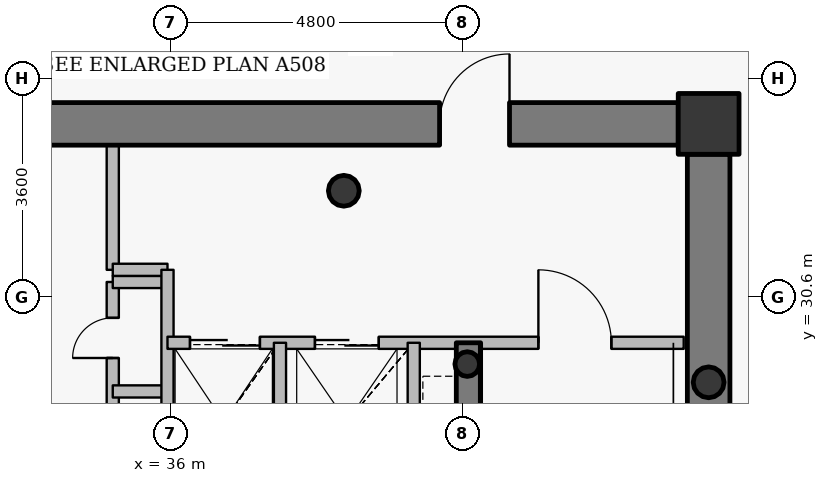
"""IFC4 building model, lengths in metres.
Left out: names, types, materials, properties, quantities, classifications, styles, units other than length and angle.
Written with IfcOpenShell. Run it as: python <this file> out.ifc"""

import sys

from ifc_helpers import new_model, si_unit, direction, frame, frame_2d, origin, origin_2d, place, context, subcontext, project, spatial, rectangle, hollow_circle, extrude, source, transform, mapped, element, fill, save


model = new_model("IFC4")
c1 = context("Model", 3, precision=1e-05, world=origin(), true_north=direction((0.0, 1.0)))
c2 = subcontext(c1, "Body", "Model", "MODEL_VIEW")
j1 = project(units=[si_unit("LENGTHUNIT", "METRE"), si_unit("PLANEANGLEUNIT", "RADIAN")], contexts=[c1])
p1 = place(None, origin())
s1 = spatial("IfcSite", under=j1, at=p1, CompositionType="ELEMENT")
p2 = place(p1, origin())
s2 = spatial("IfcBuilding", under=s1, at=p2, CompositionType="ELEMENT")
p3 = place(p2, frame((0.0, 0.0, 299.25)))
s3 = spatial("IfcBuildingStorey", under=s2, at=p3, CompositionType="ELEMENT", Elevation=299.25)
p4 = place(p3, frame((44.85, 33.45, 0.0), z_axis=(0.0, 0.0, 1.0), x_axis=(1.0, 0.0, 0.0)))
e1 = element("IfcColumn", 1, at=p4, inside=s3, PredefinedType="COLUMN", context=c2, shape_type="SweptSolid", body=[
    extrude(rectangle(XDim=1.0, YDim=1.0, at=origin_2d()), origin(), (0.0, 0.0, 1.0), 3.75),
])
p5 = place(p3, frame((38.85, 32.35, 0.0), z_axis=(0.0, 0.0, 1.0), x_axis=(1.0, 0.0, 0.0)))
e2 = element("IfcColumn", 2, at=p5, inside=s3, PredefinedType="COLUMN", context=c2, shape_type="SweptSolid", body=[
    extrude(hollow_circle(Radius=0.254, WallThickness=0.02, at=origin_2d()), origin(), (0.0, 0.0, 1.0), 3.75),
])
p6 = place(p3, frame((40.88, 29.5, 0.0), z_axis=(0.0, 0.0, 1.0), x_axis=(1.0, 0.0, 0.0)))
e3 = element("IfcColumn", 3, at=p6, inside=s3, PredefinedType="COLUMN", context=c2, shape_type="SweptSolid", body=[
    extrude(hollow_circle(Radius=0.203, WallThickness=0.016, at=origin_2d()), origin(), (0.0, 0.0, 1.0), 3.75),
])
p7 = place(p3, frame((27.65, 33.45, 0.0), z_axis=(0.0, 0.0, 1.0), x_axis=(1.0, 0.0, 0.0)))
e4 = element("IfcWall", 4, at=p7, inside=s3, PredefinedType="SHEAR", context=c2, shape_type="SweptSolid", body=[
    extrude(rectangle(XDim=16.7, YDim=0.7, at=frame_2d((8.35, 0.0))), origin(), (0.0, 0.0, 1.0), 3.05),
])
p8 = place(p7, frame((12.775, 0.0, 0.0)))
e5 = element("IfcOpeningElement", 5, at=p8, cuts=e4, PredefinedType="OPENING", context=c2, shape_type="SweptSolid", body=[
    extrude(rectangle(XDim=1.15, YDim=2.15, at=origin_2d()), frame((0.575, 0.36, 1.075), z_axis=(0.0, -1.0, 0.0), x_axis=(1.0, 0.0, 0.0)), (0.0, 0.0, 1.0), 0.72),
])
p9 = place(p3, frame((44.85, 32.95, 0.0), z_axis=(0.0, 0.0, 1.0), x_axis=(0.0, -1.0, 0.0)))
e6 = element("IfcWall", 6, at=p9, inside=s3, PredefinedType="SHEAR", context=c2, shape_type="SweptSolid", body=[
    extrude(rectangle(XDim=11.9, YDim=0.7, at=frame_2d((5.95, 0.0))), origin(), (0.0, 0.0, 1.0), 3.05),
])
p10 = place(p3, frame((40.9, 27.25, 0.0), z_axis=(0.0, 0.0, 1.0), x_axis=(0.0, 1.0, 0.0)))
e7 = element("IfcWall", 7, at=p10, inside=s3, PredefinedType="SHEAR", context=c2, shape_type="SweptSolid", body=[
    extrude(rectangle(XDim=2.6, YDim=0.4, at=frame_2d((1.3, 0.0))), origin(), (0.0, 0.0, 1.0), 3.1),
])
p11 = place(p3, frame((44.85, 29.2, 0.0), z_axis=(0.0, 0.0, 1.0), x_axis=(1.0, 0.0, 0.0)))
e8 = element("IfcColumn", 8, at=p11, inside=s3, PredefinedType="COLUMN", context=c2, shape_type="SweptSolid", body=[
    extrude(hollow_circle(Radius=0.254, WallThickness=0.02, at=origin_2d()), origin(), (0.0, 0.0, 1.0), 3.75),
])
p12 = place(p3, frame((35.05, 27.25, 0.0), z_axis=(0.0, 0.0, 1.0), x_axis=(0.0, 1.0, 0.0)))
e9 = element("IfcWall", 9, at=p12, inside=s3, PredefinedType="PARTITIONING", context=c2, shape_type="SweptSolid", body=[
    extrude(rectangle(XDim=3.6, YDim=0.2, at=frame_2d((1.8, 0.0))), origin(), (0.0, 0.0, 1.0), 3.5),
])
p13 = place(p12, frame((0.59, 0.0, 0.0)))
e10 = element("IfcOpeningElement", 10, at=p13, cuts=e9, PredefinedType="OPENING", context=c2, shape_type="SweptSolid", body=[
    extrude(rectangle(XDim=0.66, YDim=2.05, at=origin_2d()), frame((0.33, 0.11, 1.025), z_axis=(0.0, -1.0, 0.0), x_axis=(1.0, 0.0, 0.0)), (0.0, 0.0, 1.0), 0.22),
])
p14 = place(p12, frame((2.35, 0.0, 0.0)))
e11 = element("IfcOpeningElement", 11, at=p14, cuts=e9, PredefinedType="OPENING", context=c2, shape_type="SweptSolid", body=[
    extrude(rectangle(XDim=0.66, YDim=2.05, at=origin_2d()), frame((0.33, 0.11, 1.025), z_axis=(0.0, -1.0, 0.0), x_axis=(1.0, 0.0, 0.0)), (0.0, 0.0, 1.0), 0.22),
])
for number, where, z_axis, x_axis in (
    (12, (35.05, 29.05, 0.0), (0.0, 0.0, 1.0), (1.0, 0.0, 0.0)),
    (13, (35.05, 30.85, 0.0), (0.0, 0.0, 1.0), (1.0, 0.0, 0.0)),
):
    element("IfcWall", number, at=place(p3, frame(where, z_axis=z_axis, x_axis=x_axis)), inside=s3, PredefinedType="PARTITIONING", context=c2, shape_type="SweptSolid", body=[
        extrude(rectangle(XDim=0.9, YDim=0.2, at=frame_2d((0.45, 0.0))), origin(), (0.0, 0.0, 1.0), 3.5),
    ])
p15 = place(p3, frame((35.05, 31.05, 0.0), z_axis=(0.0, 0.0, 1.0), x_axis=(0.0, 1.0, 0.0)))
e14 = element("IfcWall", 14, at=p15, inside=s3, PredefinedType="PARTITIONING", context=c2, shape_type="SweptSolid", body=[
    extrude(rectangle(XDim=2.05, YDim=0.2, at=frame_2d((1.025, 0.0))), origin(), (0.0, 0.0, 1.0), 3.085),
])
p16 = place(p3, frame((35.05, 31.05, 0.0), z_axis=(0.0, 0.0, 1.0), x_axis=(1.0, 0.0, 0.0)))
e15 = element("IfcWall", 15, at=p16, inside=s3, PredefinedType="PARTITIONING", context=c2, shape_type="SweptSolid", body=[
    extrude(rectangle(XDim=0.9, YDim=0.2, at=frame_2d((0.45, 0.0))), origin(), (0.0, 0.0, 1.0), 3.5),
])
p17 = place(p3, frame((35.95, 27.25, 0.0), z_axis=(0.0, 0.0, 1.0), x_axis=(0.0, 1.0, 0.0)))
e16 = element("IfcWall", 16, at=p17, inside=s3, PredefinedType="PARTITIONING", context=c2, shape_type="SweptSolid", body=[
    extrude(rectangle(XDim=3.8, YDim=0.2, at=frame_2d((1.9, 0.0))), origin(), (0.0, 0.0, 1.0), 3.5),
])
p18 = place(p3, frame((35.95, 29.85, 0.0), z_axis=(0.0, 0.0, 1.0), x_axis=(1.0, 0.0, 0.0)))
e17 = element("IfcWall", 17, at=p18, inside=s3, PredefinedType="PARTITIONING", context=c2, shape_type="SweptSolid", body=[
    extrude(rectangle(XDim=8.49, YDim=0.2, at=frame_2d((4.245, 0.0))), origin(), (0.0, 0.0, 1.0), 3.085),
])
p19 = place(p18, frame((6.1, 0.0, 0.0)))
e18 = element("IfcOpeningElement", 18, at=p19, cuts=e17, PredefinedType="OPENING", context=c2, shape_type="SweptSolid", body=[
    extrude(rectangle(XDim=1.2, YDim=2.15, at=origin_2d()), frame((0.6, 0.11, 1.075), z_axis=(0.0, -1.0, 0.0), x_axis=(1.0, 0.0, 0.0)), (0.0, 0.0, 1.0), 0.22),
])
p20 = place(p18, frame((0.37, 0.0, 0.0)))
e19 = element("IfcOpeningElement", 19, at=p20, cuts=e17, PredefinedType="OPENING", context=c2, shape_type="SweptSolid", body=[
    extrude(rectangle(XDim=1.15, YDim=2.15, at=origin_2d()), frame((0.575, 0.11, 1.075), z_axis=(0.0, -1.0, 0.0), x_axis=(1.0, 0.0, 0.0)), (0.0, 0.0, 1.0), 0.22),
])
p21 = place(p18, frame((2.425, 0.0, 0.0)))
e20 = element("IfcOpeningElement", 20, at=p21, cuts=e17, PredefinedType="OPENING", context=c2, shape_type="SweptSolid", body=[
    extrude(rectangle(XDim=1.05, YDim=2.15, at=origin_2d()), frame((0.525, 0.11, 1.075), z_axis=(0.0, -1.0, 0.0), x_axis=(1.0, 0.0, 0.0)), (0.0, 0.0, 1.0), 0.22),
])
p22 = place(p3, frame((37.8, 27.25, 0.0), z_axis=(0.0, 0.0, 1.0), x_axis=(0.0, 1.0, 0.0)))
e21 = element("IfcWall", 21, at=p22, inside=s3, PredefinedType="PARTITIONING", context=c2, shape_type="SweptSolid", body=[
    extrude(rectangle(XDim=2.6, YDim=0.2, at=frame_2d((1.3, 0.0))), origin(), (0.0, 0.0, 1.0), 3.5),
])
p23 = place(p3, frame((40.0, 25.45, 0.0), z_axis=(0.0, 0.0, 1.0), x_axis=(0.0, 1.0, 0.0)))
e22 = element("IfcWall", 22, at=p23, inside=s3, PredefinedType="PARTITIONING", context=c2, shape_type="SweptSolid", body=[
    extrude(rectangle(XDim=4.4, YDim=0.2, at=frame_2d((2.2, 0.0))), origin(), (0.0, 0.0, 1.0), 3.5),
])
p24 = place(p3, frame((45.2, 33.8, 0.0), z_axis=(0.0, 0.0, 1.0), x_axis=(-1.0, 0.0, 0.0)))
e23 = element("IfcWall", 23, at=p24, inside=s3, PredefinedType="PARTITIONING", context=c2, shape_type="SweptSolid", body=[
    extrude(rectangle(XDim=0.84, YDim=0.135, at=frame_2d((0.42, 0.0))), origin(), (0.0, 0.0, 1.0), 3.035),
])
p25 = place(p3, frame((45.2, 32.96, 0.0), z_axis=(0.0, 0.0, 1.0), x_axis=(0.0, 1.0, 0.0)))
e24 = element("IfcWall", 24, at=p25, inside=s3, PredefinedType="PARTITIONING", context=c2, shape_type="SweptSolid", body=[
    extrude(rectangle(XDim=0.532, YDim=0.135, at=frame_2d((0.266, 0.0))), origin(), (0.0, 0.0, 1.0), 3.5),
])
m1 = source(origin(), c2, "Body", "SweptSolid", [
    extrude(rectangle(XDim=1.15, YDim=2.15, at=origin_2d()), frame((0.575, 0.025, 1.075), z_axis=(0.0, -1.0, 0.0), x_axis=(1.0, 0.0, 0.0)), (0.0, 0.0, 1.0), 0.05),
])
p26 = place(p8, origin())
e25 = element("IfcDoor", 25, at=p26, inside=s3, OperationType="SINGLE_SWING_RIGHT", PredefinedType="DOOR", context=c2, shape_type="MappedRepresentation", body=[
    mapped(m1, transform((0.0, 0.0, 0.0), x_axis=(1.0, 0.0, 0.0), y_axis=(0.0, 1.0, 0.0), z_axis=(0.0, 0.0, 1.0), scale=1.0)),
])
fill(e5, e25)
m2 = source(origin(), c2, "Body", "SweptSolid", [
    extrude(rectangle(XDim=1.2, YDim=2.15, at=origin_2d()), frame((0.6, 0.025, 1.075), z_axis=(0.0, -1.0, 0.0), x_axis=(1.0, 0.0, 0.0)), (0.0, 0.0, 1.0), 0.05),
])
p27 = place(p19, origin())
e26 = element("IfcDoor", 26, at=p27, inside=s3, OperationType="SINGLE_SWING_LEFT", PredefinedType="DOOR", context=c2, shape_type="MappedRepresentation", body=[
    mapped(m2, transform((0.0, 0.0, 0.0), x_axis=(1.0, 0.0, 0.0), y_axis=(0.0, 1.0, 0.0), z_axis=(0.0, 0.0, 1.0), scale=1.0)),
])
fill(e18, e26)
m3 = source(origin(), c2, "Body", "SweptSolid", [
    extrude(rectangle(XDim=1.15, YDim=2.15, at=origin_2d()), frame((0.575, 0.025, 1.075), z_axis=(0.0, -1.0, 0.0), x_axis=(1.0, 0.0, 0.0)), (0.0, 0.0, 1.0), 0.05),
])
p28 = place(p20, origin())
e27 = element("IfcDoor", 27, at=p28, inside=s3, OperationType="DOUBLE_DOOR_SLIDING", PredefinedType="USERDEFINED", context=c2, shape_type="MappedRepresentation", body=[
    mapped(m3, transform((0.0, 0.0, 0.0), x_axis=(1.0, 0.0, 0.0), y_axis=(0.0, 1.0, 0.0), z_axis=(0.0, 0.0, 1.0), scale=1.0)),
])
fill(e19, e27)
m4 = source(origin(), c2, "Body", "SweptSolid", [
    extrude(rectangle(XDim=1.05, YDim=2.15, at=origin_2d()), frame((0.525, 0.025, 1.075), z_axis=(0.0, -1.0, 0.0), x_axis=(1.0, 0.0, 0.0)), (0.0, 0.0, 1.0), 0.05),
])
p29 = place(p21, origin())
e28 = element("IfcDoor", 28, at=p29, inside=s3, OperationType="DOUBLE_DOOR_SLIDING", PredefinedType="USERDEFINED", context=c2, shape_type="MappedRepresentation", body=[
    mapped(m4, transform((0.0, 0.0, 0.0), x_axis=(1.0, 0.0, 0.0), y_axis=(0.0, 1.0, 0.0), z_axis=(0.0, 0.0, 1.0), scale=1.0)),
])
fill(e20, e28)
m5 = source(origin(), c2, "Body", "SweptSolid", [
    extrude(rectangle(XDim=0.66, YDim=2.05, at=origin_2d()), frame((0.33, 0.025, 1.025), z_axis=(0.0, -1.0, 0.0), x_axis=(1.0, 0.0, 0.0)), (0.0, 0.0, 1.0), 0.05),
])
p30 = place(p14, origin())
e29 = element("IfcDoor", 29, at=p30, inside=s3, OperationType="SINGLE_SWING_LEFT", PredefinedType="USERDEFINED", context=c2, shape_type="MappedRepresentation", body=[
    mapped(m5, transform((0.0, 0.0, 0.0), x_axis=(1.0, 0.0, 0.0), y_axis=(0.0, 1.0, 0.0), z_axis=(0.0, 0.0, 1.0), scale=1.0)),
])
fill(e11, e29)
save(model, sys.argv[1])
